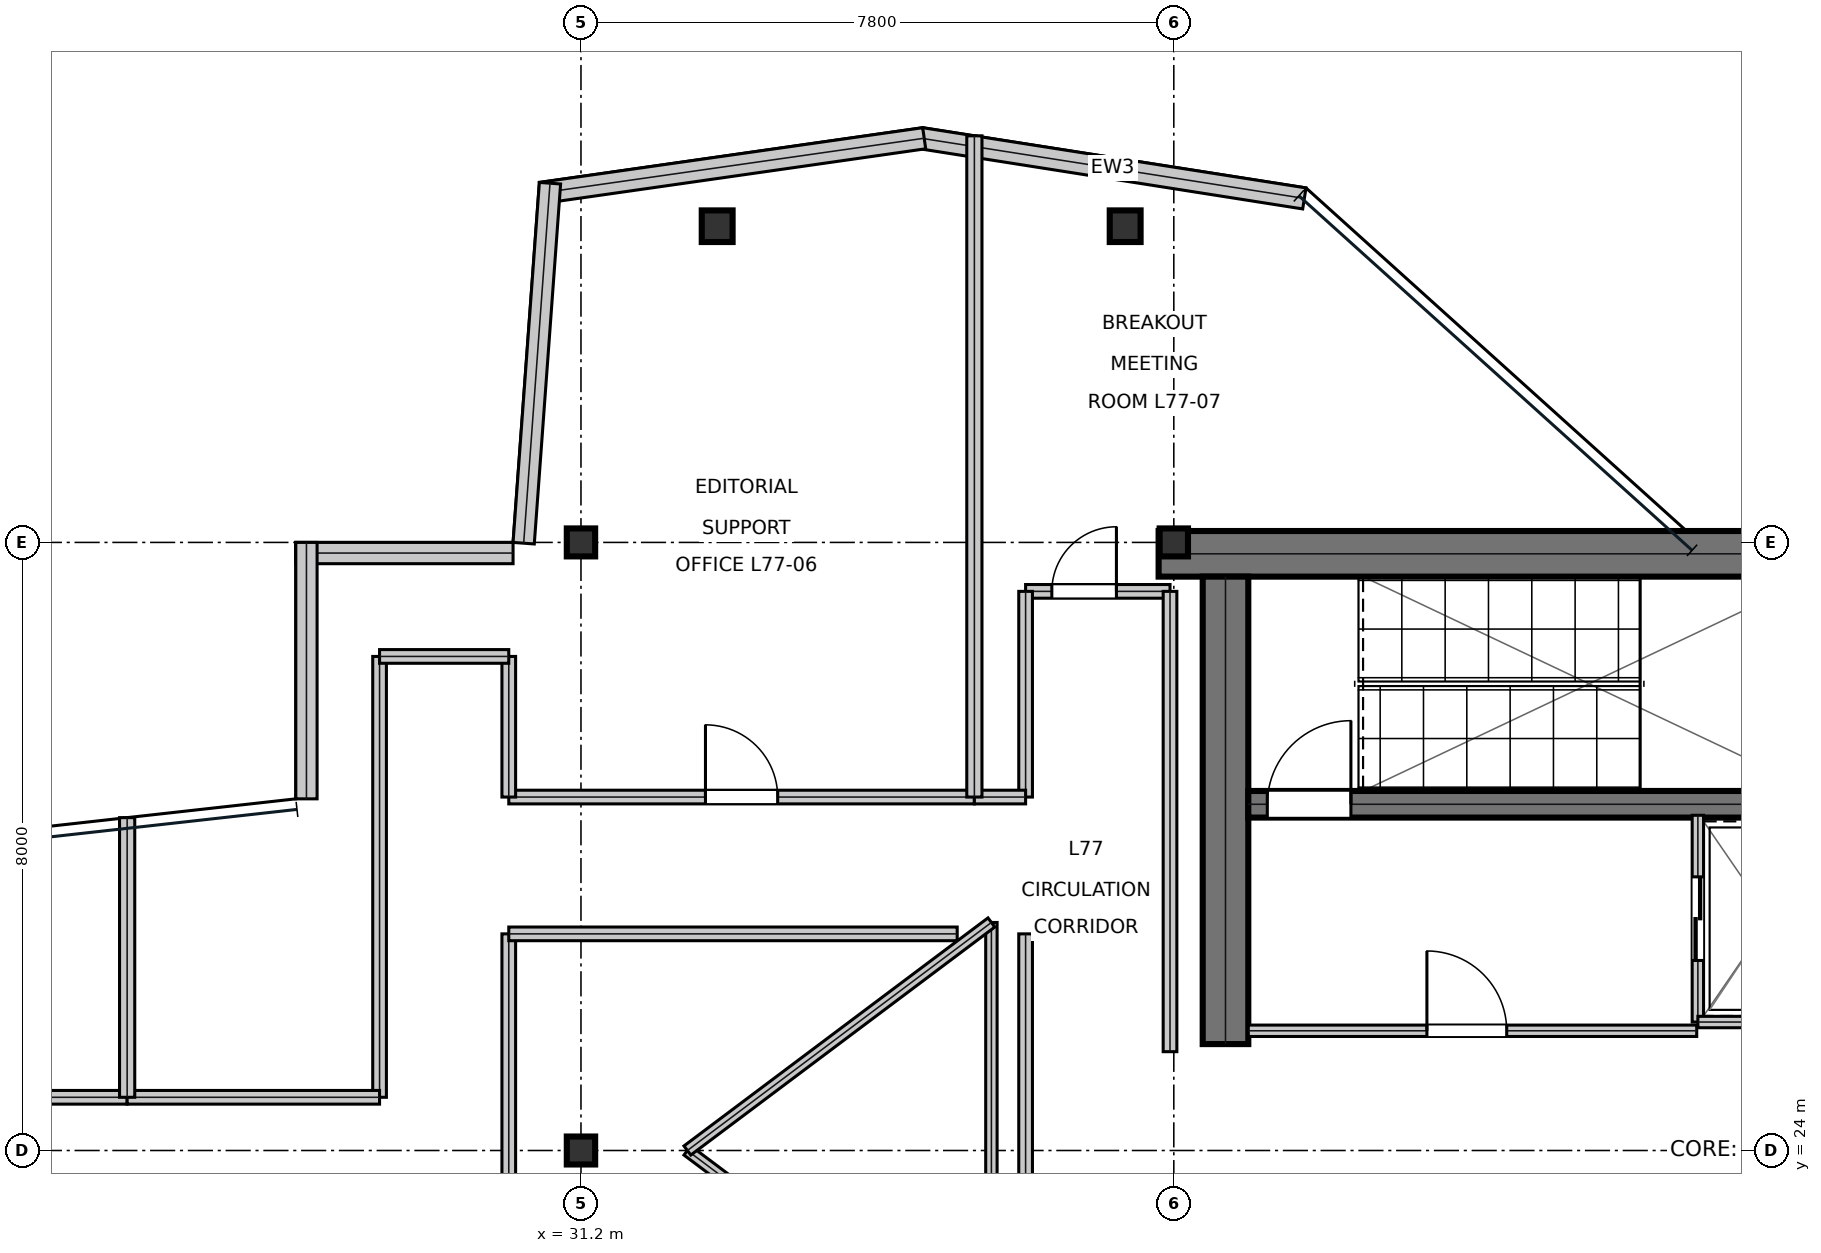
"""IFC4 building model, lengths in metres.
Left out: names, types, materials, properties, quantities, classifications, styles, units other than length and angle.
Written with IfcOpenShell. Run it as: python <this file> out.ifc"""

import sys

from ifc_helpers import new_model, si_unit, direction, frame, frame_2d, origin, origin_2d, place, context, subcontext, project, spatial, rectangle, i_section, extrude, element, fill, save


model = new_model("IFC4")
c1 = context("Model", 3, precision=1e-05, world=origin(), true_north=direction((0.0, 1.0)))
c2 = subcontext(c1, "Body", "Model", "MODEL_VIEW")
j1 = project(units=[si_unit("LENGTHUNIT", "METRE"), si_unit("PLANEANGLEUNIT", "RADIAN")], contexts=[c1])
p1 = place(None, origin())
s1 = spatial("IfcSite", under=j1, at=p1, CompositionType="ELEMENT")
p2 = place(p1, origin())
s2 = spatial("IfcBuilding", under=s1, at=p2, CompositionType="ELEMENT")
p3 = place(p2, frame((0.0, 0.0, 327.6)))
s3 = spatial("IfcBuildingStorey", under=s2, at=p3, CompositionType="ELEMENT", Elevation=327.6)
p4 = place(p3, frame((38.8, 31.85, 0.0), z_axis=(0.0, 0.0, 1.0), x_axis=(1.0, 0.0, 0.0)))
e1 = element("IfcWall", 1, at=p4, inside=s3, PredefinedType="SHEAR", context=c2, shape_type="SweptSolid", body=[
    extrude(rectangle(XDim=16.0, YDim=0.6, at=frame_2d((8.0, 0.0))), origin(), (0.0, 0.0, 1.0), 4.48),
])
p5 = place(p3, frame((39.68, 25.4, 0.0), z_axis=(0.0, 0.0, 1.0), x_axis=(0.0, 1.0, 0.0)))
e2 = element("IfcWall", 2, at=p5, inside=s3, PredefinedType="SHEAR", context=c2, shape_type="SweptSolid", body=[
    extrude(rectangle(XDim=6.15, YDim=0.6, at=frame_2d((3.075, 0.0))), origin(), (0.0, 0.0, 1.0), 4.48),
])
p6 = place(p3, frame((39.98, 28.555, 0.0), z_axis=(0.0, 0.0, 1.0), x_axis=(1.0, 0.0, 0.0)))
e3 = element("IfcWall", 3, at=p6, inside=s3, PredefinedType="SHEAR", context=c2, shape_type="SweptSolid", body=[
    extrude(rectangle(XDim=7.71, YDim=0.35, at=frame_2d((3.855, 0.0))), origin(), (0.0, 0.0, 1.0), 4.48),
])
p7 = place(p6, frame((0.25, 0.0, 0.0)))
e4 = element("IfcOpeningElement", 4, at=p7, cuts=e3, PredefinedType="OPENING", context=c2, shape_type="SweptSolid", body=[
    extrude(rectangle(XDim=1.1, YDim=2.15, at=frame_2d((0.55, 1.075))), frame((0.0, 0.185, 0.0), z_axis=(0.0, -1.0, 0.0), x_axis=(1.0, 0.0, 0.0)), (0.0, 0.0, 1.0), 0.37),
])
for number, where, z_axis, x_axis in (
    (5, (31.2, 24.0, 0.0), (0.0, 0.0, 1.0), (1.0, 0.0, 0.0)),
    (6, (31.2, 32.0, 0.0), (0.0, 0.0, 1.0), (1.0, 0.0, 0.0)),
    (7, (39.0, 32.0, 0.0), (0.0, 0.0, 1.0), (1.0, 0.0, 0.0)),
):
    element("IfcColumn", number, at=place(p3, frame(where, z_axis=z_axis, x_axis=x_axis)), inside=s3, PredefinedType="COLUMN", context=c2, shape_type="SweptSolid", body=[
        extrude(i_section(OverallWidth=0.373, OverallDepth=0.368, WebThickness=0.015, FlangeThickness=0.024, at=origin_2d()), origin(), (0.0, 0.0, 1.0), 4.794),
    ])
p8 = place(p3, frame((32.992, 36.16, 0.016), z_axis=(0.02346612672, -0.050255343281, 0.99846068594), x_axis=(0.906088923183, 0.423087299838, 0.0)))
e8 = element("IfcColumn", 8, at=p8, inside=s3, PredefinedType="COLUMN", context=c2, shape_type="SweptSolid", body=[
    extrude(i_section(OverallWidth=0.406, OverallDepth=0.416, WebThickness=0.03, FlangeThickness=0.048, at=origin_2d()), origin(), (0.0, 0.0, 1.0), 4.775),
])
p9 = place(p3, frame((38.36, 36.16, 0.016), z_axis=(-0.008386425787, -0.050267417979, 0.998700583034), x_axis=(0.986366790816, -0.164561702639, 0.0)))
e9 = element("IfcColumn", 9, at=p9, inside=s3, PredefinedType="COLUMN", context=c2, shape_type="SweptSolid", body=[
    extrude(i_section(OverallWidth=0.406, OverallDepth=0.416, WebThickness=0.03, FlangeThickness=0.048, at=origin_2d()), origin(), (0.0, 0.0, 1.0), 4.774),
])
p10 = place(p3, frame((40.718, 36.526, 0.0), z_axis=(0.0, 0.0, 1.0), x_axis=(-0.987892522015, 0.155139823857, 0.0)))
e10 = element("IfcWall", 10, at=p10, inside=s3, PredefinedType="STANDARD", context=c2, shape_type="SweptSolid", body=[
    extrude(rectangle(XDim=5.105, YDim=0.28, at=frame_2d((2.552, 0.0))), origin(), (0.0, 0.0, 1.0), 4.48),
])
p11 = place(p3, frame((35.716, 37.317, 0.0), z_axis=(0.0, 0.0, 1.0), x_axis=(-0.989962907882, -0.141327424861, 0.0)))
e11 = element("IfcWall", 11, at=p11, inside=s3, PredefinedType="STANDARD", context=c2, shape_type="SweptSolid", body=[
    extrude(rectangle(XDim=5.094, YDim=0.28, at=frame_2d((2.547, 0.0))), origin(), (0.0, 0.0, 1.0), 4.48),
])
p12 = place(p3, frame((30.792, 36.726, 0.0), z_axis=(0.0, 0.0, 1.0), x_axis=(-0.072953187508, -0.997335366079, 0.0)))
e12 = element("IfcWall", 12, at=p12, inside=s3, PredefinedType="STANDARD", context=c2, shape_type="SweptSolid", body=[
    extrude(rectangle(XDim=4.749, YDim=0.28, at=frame_2d((2.375, 0.0))), origin(), (0.0, 0.0, 1.0), 4.48),
])
p13 = place(p3, frame((30.306, 31.86, 0.0), z_axis=(0.0, 0.0, 1.0), x_axis=(-1.0, 0.0, 0.0)))
e13 = element("IfcWall", 13, at=p13, inside=s3, PredefinedType="STANDARD", context=c2, shape_type="SweptSolid", body=[
    extrude(rectangle(XDim=2.858, YDim=0.28, at=frame_2d((1.429, 0.0))), origin(), (0.0, 0.0, 1.0), 4.48),
])
p14 = place(p3, frame((27.588, 32.0, 0.0), z_axis=(0.0, 0.0, 1.0), x_axis=(0.0, -1.0, 0.0)))
e14 = element("IfcWall", 14, at=p14, inside=s3, PredefinedType="STANDARD", context=c2, shape_type="SweptSolid", body=[
    extrude(rectangle(XDim=3.374, YDim=0.28, at=frame_2d((1.687, 0.0))), origin(), (0.0, 0.0, 1.0), 4.009),
])
p15 = place(p3, frame((39.98, 25.575, 0.0), z_axis=(0.0, 0.0, 1.0), x_axis=(1.0, 0.0, 0.0)))
e15 = element("IfcWall", 15, at=p15, inside=s3, PredefinedType="PARTITIONING", context=c2, shape_type="SweptSolid", body=[
    extrude(rectangle(XDim=5.9, YDim=0.15, at=frame_2d((2.95, 0.0))), origin(), (0.0, 0.0, 1.0), 4.48),
])
p16 = place(p15, frame((2.35, 0.0, 0.0)))
e16 = element("IfcOpeningElement", 16, at=p16, cuts=e15, PredefinedType="OPENING", context=c2, shape_type="SweptSolid", body=[
    extrude(rectangle(XDim=1.05, YDim=2.15, at=frame_2d((0.525, 1.075))), frame((0.0, 0.085, 0.0), z_axis=(0.0, -1.0, 0.0), x_axis=(1.0, 0.0, 0.0)), (0.0, 0.0, 1.0), 0.17),
])
p17 = place(p3, frame((45.895, 25.69, 0.0), z_axis=(0.0, 0.0, 1.0), x_axis=(0.0, 1.0, 0.0)))
e17 = element("IfcWall", 17, at=p17, inside=s3, PredefinedType="PARTITIONING", context=c2, shape_type="SweptSolid", body=[
    extrude(rectangle(XDim=2.72, YDim=0.15, at=frame_2d((1.36, 0.0))), origin(), (0.0, 0.0, 1.0), 4.48),
])
p18 = place(p17, frame((0.81, 0.0, 0.0)))
e18 = element("IfcOpeningElement", 18, at=p18, cuts=e17, PredefinedType="OPENING", context=c2, shape_type="SweptSolid", body=[
    extrude(rectangle(XDim=1.1, YDim=2.15, at=frame_2d((0.55, 1.075))), frame((0.0, 0.085, 0.0), z_axis=(0.0, -1.0, 0.0), x_axis=(1.0, 0.0, 0.0)), (0.0, 0.0, 1.0), 0.17),
])
p19 = place(p3, frame((45.895, 25.69, 0.0), z_axis=(0.0, 0.0, 1.0), x_axis=(1.0, 0.0, 0.0)))
e19 = element("IfcWall", 19, at=p19, inside=s3, PredefinedType="PARTITIONING", context=c2, shape_type="SweptSolid", body=[
    extrude(rectangle(XDim=1.915, YDim=0.15, at=frame_2d((0.958, 0.0))), origin(), (0.0, 0.0, 1.0), 4.48),
])
p20 = place(p3, frame((30.25, 19.156, 0.0), z_axis=(0.0, 0.0, 1.0), x_axis=(0.0, 1.0, 0.0)))
e20 = element("IfcWall", 20, at=p20, inside=s3, PredefinedType="SOLIDWALL", context=c2, shape_type="SweptSolid", body=[
    extrude(rectangle(XDim=7.694, YDim=0.18, at=frame_2d((3.847, 0.0))), origin(), (0.0, 0.0, 1.0), 3.94),
])
p21 = place(p20, frame((2.292, 0.0, 0.0)))
e21 = element("IfcOpeningElement", 21, at=p21, cuts=e20, PredefinedType="OPENING", context=c2, shape_type="SweptSolid", body=[
    extrude(rectangle(XDim=0.95, YDim=2.15, at=frame_2d((0.475, 1.075))), frame((0.0, 0.1, 0.0), z_axis=(0.0, -1.0, 0.0), x_axis=(1.0, 0.0, 0.0)), (0.0, 0.0, 1.0), 0.2),
])
p22 = place(p3, frame((30.25, 28.65, 0.0), z_axis=(0.0, 0.0, 1.0), x_axis=(1.0, 0.0, 0.0)))
e22 = element("IfcWall", 22, at=p22, inside=s3, PredefinedType="SOLIDWALL", context=c2, shape_type="SweptSolid", body=[
    extrude(rectangle(XDim=6.126, YDim=0.18, at=frame_2d((3.063, 0.0))), origin(), (0.0, 0.0, 1.0), 3.94),
])
p23 = place(p22, frame((2.588, 0.0, 0.0)))
e23 = element("IfcOpeningElement", 23, at=p23, cuts=e22, PredefinedType="OPENING", context=c2, shape_type="SweptSolid", body=[
    extrude(rectangle(XDim=0.95, YDim=2.15, at=frame_2d((0.475, 1.075))), frame((0.0, 0.1, 0.0), z_axis=(0.0, -1.0, 0.0), x_axis=(1.0, 0.0, 0.0)), (0.0, 0.0, 1.0), 0.2),
])
p24 = place(p3, frame((37.05, 31.356, 0.0), z_axis=(0.0, 0.0, 1.0), x_axis=(1.0, 0.0, 0.0)))
e24 = element("IfcWall", 24, at=p24, inside=s3, PredefinedType="SOLIDWALL", context=c2, shape_type="SweptSolid", body=[
    extrude(rectangle(XDim=1.9, YDim=0.18, at=frame_2d((0.95, 0.0))), origin(), (0.0, 0.0, 1.0), 4.48),
])
p25 = place(p24, frame((0.345, 0.0, 0.0)))
e25 = element("IfcOpeningElement", 25, at=p25, cuts=e24, PredefinedType="OPENING", context=c2, shape_type="SweptSolid", body=[
    extrude(rectangle(XDim=0.85, YDim=2.15, at=frame_2d((0.425, 1.075))), frame((0.0, 0.1, 0.0), z_axis=(0.0, -1.0, 0.0), x_axis=(1.0, 0.0, 0.0)), (0.0, 0.0, 1.0), 0.2),
])
p26 = place(p3, frame((37.05, 16.644, 0.0), z_axis=(0.0, 0.0, 1.0), x_axis=(0.0, 1.0, 0.0)))
e26 = element("IfcWall", 26, at=p26, inside=s3, PredefinedType="SOLIDWALL", context=c2, shape_type="SweptSolid", body=[
    extrude(rectangle(XDim=10.206, YDim=0.18, at=frame_2d((5.103, 0.0))), origin(), (0.0, 0.0, 1.0), 4.21),
])
p27 = place(p3, frame((30.25, 26.85, 0.0), z_axis=(0.0, 0.0, 1.0), x_axis=(1.0, 0.0, 0.0)))
e27 = element("IfcWall", 27, at=p27, inside=s3, PredefinedType="SOLIDWALL", context=c2, shape_type="SweptSolid", body=[
    extrude(rectangle(XDim=5.9, YDim=0.18, at=frame_2d((2.95, 0.0))), origin(), (0.0, 0.0, 1.0), 3.94),
])
p28 = place(p3, frame((21.936, 24.7, 0.0), z_axis=(0.0, 0.0, 1.0), x_axis=(1.0, 0.0, 0.0)))
e28 = element("IfcWall", 28, at=p28, inside=s3, PredefinedType="SOLIDWALL", context=c2, shape_type="SweptSolid", body=[
    extrude(rectangle(XDim=3.293, YDim=0.18, at=frame_2d((1.646, 0.0))), origin(), (0.0, 0.0, 1.0), 4.21),
])
p29 = place(p3, frame((28.55, 24.7, 0.0), z_axis=(0.0, 0.0, 1.0), x_axis=(0.0, 1.0, 0.0)))
e29 = element("IfcWall", 29, at=p29, inside=s3, PredefinedType="SOLIDWALL", context=c2, shape_type="SweptSolid", body=[
    extrude(rectangle(XDim=5.8, YDim=0.18, at=frame_2d((2.9, 0.0))), origin(), (0.0, 0.0, 1.0), 4.48),
])
p30 = place(p3, frame((25.229, 24.7, 0.0), z_axis=(0.0, 0.0, 1.0), x_axis=(1.0, 0.0, 0.0)))
e30 = element("IfcWall", 30, at=p30, inside=s3, PredefinedType="SOLIDWALL", context=c2, shape_type="SweptSolid", body=[
    extrude(rectangle(XDim=3.321, YDim=0.18, at=frame_2d((1.661, 0.0))), origin(), (0.0, 0.0, 1.0), 3.94),
])
p31 = place(p3, frame((30.25, 28.65, 0.0), z_axis=(0.0, 0.0, 1.0), x_axis=(0.0, 1.0, 0.0)))
e31 = element("IfcWall", 31, at=p31, inside=s3, PredefinedType="SOLIDWALL", context=c2, shape_type="SweptSolid", body=[
    extrude(rectangle(XDim=1.85, YDim=0.18, at=frame_2d((0.925, 0.0))), origin(), (0.0, 0.0, 1.0), 4.48),
])
p32 = place(p3, frame((28.55, 30.5, 0.0), z_axis=(0.0, 0.0, 1.0), x_axis=(1.0, 0.0, 0.0)))
e32 = element("IfcWall", 32, at=p32, inside=s3, PredefinedType="SOLIDWALL", context=c2, shape_type="SweptSolid", body=[
    extrude(rectangle(XDim=1.7, YDim=0.18, at=frame_2d((0.85, 0.0))), origin(), (0.0, 0.0, 1.0), 4.48),
])
p33 = place(p3, frame((38.95, 25.3, 0.0), z_axis=(0.0, 0.0, 1.0), x_axis=(0.0, 1.0, 0.0)))
e33 = element("IfcWall", 33, at=p33, inside=s3, PredefinedType="SOLIDWALL", context=c2, shape_type="SweptSolid", body=[
    extrude(rectangle(XDim=6.056, YDim=0.18, at=frame_2d((3.028, 0.0))), origin(), (0.0, 0.0, 1.0), 4.21),
])
p34 = place(p3, frame((37.05, 28.65, 0.0), z_axis=(0.0, 0.0, 1.0), x_axis=(0.0, 1.0, 0.0)))
e34 = element("IfcWall", 34, at=p34, inside=s3, PredefinedType="SOLIDWALL", context=c2, shape_type="SweptSolid", body=[
    extrude(rectangle(XDim=2.706, YDim=0.18, at=frame_2d((1.353, 0.0))), origin(), (0.0, 0.0, 1.0), 4.21),
])
p35 = place(p3, frame((36.376, 28.65, 0.0), z_axis=(0.0, 0.0, 1.0), x_axis=(1.0, 0.0, 0.0)))
e35 = element("IfcWall", 35, at=p35, inside=s3, PredefinedType="SOLIDWALL", context=c2, shape_type="SweptSolid", body=[
    extrude(rectangle(XDim=0.674, YDim=0.18, at=frame_2d((0.337, 0.0))), origin(), (0.0, 0.0, 1.0), 4.48),
])
p36 = place(p3, frame((25.229, 24.7, 0.0), z_axis=(0.0, 0.0, 1.0), x_axis=(0.0, 1.0, 0.0)))
e36 = element("IfcWall", 36, at=p36, inside=s3, PredefinedType="SOLIDWALL", context=c2, shape_type="SweptSolid", body=[
    extrude(rectangle(XDim=3.679, YDim=0.2, at=frame_2d((1.84, 0.0))), origin(), (0.0, 0.0, 1.0), 3.94),
])
p37 = place(p3, frame((36.376, 28.65, 0.0), z_axis=(0.0, 0.0, 1.0), x_axis=(0.0, 1.0, 0.0)))
e37 = element("IfcWall", 37, at=p37, inside=s3, PredefinedType="SOLIDWALL", context=c2, shape_type="SweptSolid", body=[
    extrude(rectangle(XDim=8.699, YDim=0.2, at=frame_2d((4.35, 0.0))), origin(), (0.0, 0.0, 1.0), 3.94),
])
p38 = place(p3, frame((32.6, 24.0, 0.0), z_axis=(0.0, 0.0, 1.0), x_axis=(0.8, -0.6, 0.0)))
e38 = element("IfcWall", 38, at=p38, inside=s3, PredefinedType="MOVABLE", context=c2, shape_type="SweptSolid", body=[
    extrude(rectangle(XDim=5.0, YDim=0.15, at=frame_2d((2.5, 0.0))), origin(), (0.0, 0.0, 1.0), 4.48),
])
p39 = place(p3, frame((36.6, 21.0, 0.0), z_axis=(0.0, 0.0, 1.0), x_axis=(0.0, 1.0, 0.0)))
e39 = element("IfcWall", 39, at=p39, inside=s3, PredefinedType="MOVABLE", context=c2, shape_type="SweptSolid", body=[
    extrude(rectangle(XDim=6.0, YDim=0.15, at=frame_2d((3.0, 0.0))), origin(), (0.0, 0.0, 1.0), 4.48),
])
p40 = place(p3, frame((36.6, 27.0, 0.0), z_axis=(0.0, 0.0, 1.0), x_axis=(-0.8, -0.6, 0.0)))
e40 = element("IfcWall", 40, at=p40, inside=s3, PredefinedType="MOVABLE", context=c2, shape_type="SweptSolid", body=[
    extrude(rectangle(XDim=5.0, YDim=0.15, at=frame_2d((2.5, 0.0))), origin(), (0.0, 0.0, 1.0), 4.48),
])
p41 = place(p16, origin())
e41 = element("IfcDoor", 41, at=p41, inside=s3, OperationType="SINGLE_SWING_LEFT", PredefinedType="DOOR", context=c2, shape_type="SweptSolid", body=[
    extrude(rectangle(XDim=1.05, YDim=2.15, at=frame_2d((0.525, 1.075))), frame((0.0, 0.025, 0.0), z_axis=(0.0, -1.0, 0.0), x_axis=(1.0, 0.0, 0.0)), (0.0, 0.0, 1.0), 0.05),
])
fill(e16, e41)
p42 = place(p18, frame((1.1, 0.0, 0.0), z_axis=(0.0, 0.0, 1.0), x_axis=(-1.0, 0.0, 0.0)))
e42 = element("IfcDoor", 42, at=p42, inside=s3, OperationType="DOUBLE_DOOR_SLIDING", PredefinedType="DOOR", context=c2, shape_type="SweptSolid", body=[
    extrude(rectangle(XDim=1.1, YDim=2.15, at=frame_2d((0.55, 1.075))), frame((0.0, 0.025, 0.0), z_axis=(0.0, -1.0, 0.0), x_axis=(1.0, 0.0, 0.0)), (0.0, 0.0, 1.0), 0.05),
])
fill(e18, e42)
p43 = place(p23, origin())
e43 = element("IfcDoor", 43, at=p43, inside=s3, OperationType="SINGLE_SWING_LEFT", PredefinedType="DOOR", context=c2, shape_type="SweptSolid", body=[
    extrude(rectangle(XDim=0.95, YDim=2.15, at=frame_2d((0.475, 1.075))), frame((0.0, 0.025, 0.0), z_axis=(0.0, -1.0, 0.0), x_axis=(1.0, 0.0, 0.0)), (0.0, 0.0, 1.0), 0.05),
])
fill(e23, e43)
p44 = place(p25, origin())
e44 = element("IfcDoor", 44, at=p44, inside=s3, OperationType="SINGLE_SWING_RIGHT", PredefinedType="DOOR", context=c2, shape_type="SweptSolid", body=[
    extrude(rectangle(XDim=0.85, YDim=2.15, at=frame_2d((0.425, 1.075))), frame((0.0, 0.025, 0.0), z_axis=(0.0, -1.0, 0.0), x_axis=(1.0, 0.0, 0.0)), (0.0, 0.0, 1.0), 0.05),
])
fill(e25, e44)
p45 = place(p7, origin())
e45 = element("IfcDoor", 45, at=p45, inside=s3, OperationType="SINGLE_SWING_RIGHT", PredefinedType="DOOR", context=c2, shape_type="SweptSolid", body=[
    extrude(rectangle(XDim=1.1, YDim=2.15, at=frame_2d((0.55, 1.075))), frame((0.0, 0.025, 0.0), z_axis=(0.0, -1.0, 0.0), x_axis=(1.0, 0.0, 0.0)), (0.0, 0.0, 1.0), 0.05),
])
fill(e4, e45)
save(model, sys.argv[1])
